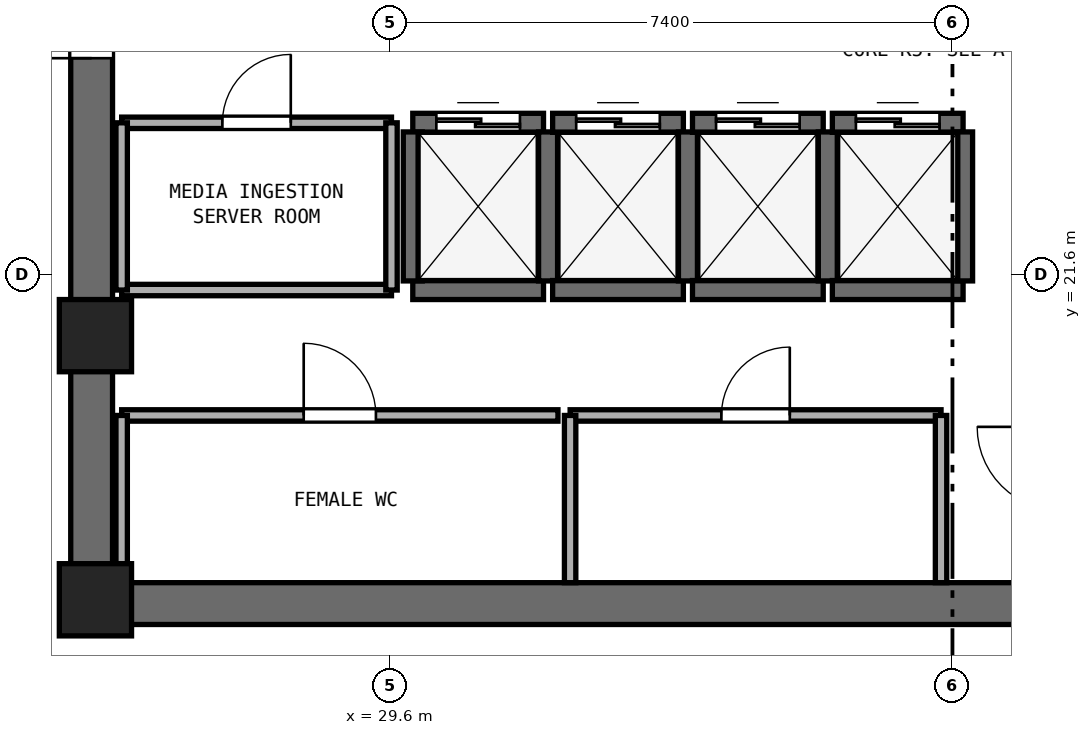
"""IFC4 building model, lengths in metres.
Left out: names, types, materials, properties, quantities, classifications, styles, units other than length and angle.
Written with IfcOpenShell. Run it as: python <this file> out.ifc"""

import sys

from ifc_helpers import new_model, si_unit, direction, frame, frame_2d, origin, origin_2d, place, context, subcontext, project, spatial, rectangle, extrude, element, fill, save


model = new_model("IFC4")
c1 = context("Model", 3, precision=1e-05, world=origin(), true_north=direction((0.0, 1.0)))
c2 = subcontext(c1, "Body", "Model", "MODEL_VIEW")
j1 = project(units=[si_unit("LENGTHUNIT", "METRE"), si_unit("PLANEANGLEUNIT", "RADIAN")], contexts=[c1])
p1 = place(None, origin())
s1 = spatial("IfcSite", under=j1, at=p1, CompositionType="ELEMENT")
p2 = place(p1, origin())
s2 = spatial("IfcBuilding", under=s1, at=p2, CompositionType="ELEMENT")
p3 = place(p2, frame((0.0, 0.0, 212.4)))
s3 = spatial("IfcBuildingStorey", under=s2, at=p3, CompositionType="ELEMENT", Elevation=212.4)
p4 = place(p3, frame((25.4, 17.275, 0.0), z_axis=(0.0, 0.0, 1.0), x_axis=(1.0, 0.0, 0.0)))
e1 = element("IfcWall", 1, at=p4, inside=s3, PredefinedType="SHEAR", context=c2, shape_type="SweptSolid", body=[
    extrude(rectangle(XDim=23.2, YDim=0.55, at=frame_2d((11.6, 0.0))), origin(), (0.0, 0.0, 1.0), 3.54),
])
p5 = place(p3, frame((25.675, 17.55, 0.0), z_axis=(0.0, 0.0, 1.0), x_axis=(0.0, 1.0, 0.0)))
e2 = element("IfcWall", 2, at=p5, inside=s3, PredefinedType="SHEAR", context=c2, shape_type="SweptSolid", body=[
    extrude(rectangle(XDim=15.3, YDim=0.55, at=frame_2d((7.65, 0.0))), origin(), (0.0, 0.0, 1.0), 3.54),
])
p6 = place(p5, frame((6.9, 0.0, 0.0)))
e3 = element("IfcOpeningElement", 3, at=p6, cuts=e2, PredefinedType="OPENING", context=c2, shape_type="SweptSolid", body=[
    extrude(rectangle(XDim=1.5, YDim=2.15, at=frame_2d((0.75, 1.075))), frame((0.0, 0.285, 0.0), z_axis=(0.0, -1.0, 0.0), x_axis=(1.0, 0.0, 0.0)), (0.0, 0.0, 1.0), 0.57),
])
for number, where, z_axis, x_axis in (
    (4, (25.725, 17.325, 0.0), (0.0, 0.0, 1.0), (1.0, 0.0, 0.0)),
    (5, (25.725, 20.8, 0.0), (0.0, 0.0, 1.0), (1.0, 0.0, 0.0)),
):
    element("IfcColumn", number, at=place(p3, frame(where, z_axis=z_axis, x_axis=x_axis)), inside=s3, PredefinedType="PILASTER", context=c2, shape_type="SweptSolid", body=[
        extrude(rectangle(XDim=0.95, YDim=0.95, at=origin_2d()), origin(), (0.0, 0.0, 1.0), 3.8),
    ])
p7 = place(p3, frame((29.9, 21.4, 0.0), z_axis=(0.0, 0.0, 1.0), x_axis=(1.0, 0.0, 0.0)))
e6 = element("IfcWall", 6, at=p7, inside=s3, PredefinedType="SHEAR", context=c2, shape_type="SweptSolid", body=[
    extrude(rectangle(XDim=1.72, YDim=0.25, at=frame_2d((0.86, 0.0))), origin(), (0.0, 0.0, 1.0), 3.54),
])
p8 = place(p3, frame((29.9, 23.6, 0.0), z_axis=(0.0, 0.0, 1.0), x_axis=(1.0, 0.0, 0.0)))
e7 = element("IfcWall", 7, at=p8, inside=s3, PredefinedType="SHEAR", context=c2, shape_type="SweptSolid", body=[
    extrude(rectangle(XDim=1.72, YDim=0.25, at=frame_2d((0.86, 0.0))), origin(), (0.0, 0.0, 1.0), 3.54),
])
p9 = place(p8, frame((0.31, 0.0, 0.0)))
e8 = element("IfcOpeningElement", 8, at=p9, cuts=e7, PredefinedType="OPENING", context=c2, shape_type="SweptSolid", body=[
    extrude(rectangle(XDim=1.1, YDim=2.15, at=frame_2d((0.55, 1.075))), frame((0.0, 0.135, 0.0), z_axis=(0.0, -1.0, 0.0), x_axis=(1.0, 0.0, 0.0)), (0.0, 0.0, 1.0), 0.27),
])
for number, where, z_axis, x_axis in (
    (9, (29.9, 21.52, 0.0), (0.0, 0.0, 1.0), (0.0, 1.0, 0.0)),
    (10, (31.68, 21.52, 0.0), (0.0, 0.0, 1.0), (0.0, 1.0, 0.0)),
):
    element("IfcWall", number, at=place(p3, frame(where, z_axis=z_axis, x_axis=x_axis)), inside=s3, PredefinedType="SHEAR", context=c2, shape_type="SweptSolid", body=[
        extrude(rectangle(XDim=1.96, YDim=0.25, at=frame_2d((0.98, 0.0))), origin(), (0.0, 0.0, 1.0), 3.54),
    ])
p10 = place(p3, frame((31.74, 21.4, 0.0), z_axis=(0.0, 0.0, 1.0), x_axis=(1.0, 0.0, 0.0)))
e11 = element("IfcWall", 11, at=p10, inside=s3, PredefinedType="SHEAR", context=c2, shape_type="SweptSolid", body=[
    extrude(rectangle(XDim=1.72, YDim=0.25, at=frame_2d((0.86, 0.0))), origin(), (0.0, 0.0, 1.0), 3.54),
])
p11 = place(p3, frame((31.74, 23.6, 0.0), z_axis=(0.0, 0.0, 1.0), x_axis=(1.0, 0.0, 0.0)))
e12 = element("IfcWall", 12, at=p11, inside=s3, PredefinedType="SHEAR", context=c2, shape_type="SweptSolid", body=[
    extrude(rectangle(XDim=1.72, YDim=0.25, at=frame_2d((0.86, 0.0))), origin(), (0.0, 0.0, 1.0), 3.54),
])
p12 = place(p11, frame((0.31, 0.0, 0.0)))
e13 = element("IfcOpeningElement", 13, at=p12, cuts=e12, PredefinedType="OPENING", context=c2, shape_type="SweptSolid", body=[
    extrude(rectangle(XDim=1.1, YDim=2.15, at=frame_2d((0.55, 1.075))), frame((0.0, 0.135, 0.0), z_axis=(0.0, -1.0, 0.0), x_axis=(1.0, 0.0, 0.0)), (0.0, 0.0, 1.0), 0.27),
])
p13 = place(p3, frame((33.52, 21.52, 0.0), z_axis=(0.0, 0.0, 1.0), x_axis=(0.0, 1.0, 0.0)))
e14 = element("IfcWall", 14, at=p13, inside=s3, PredefinedType="SHEAR", context=c2, shape_type="SweptSolid", body=[
    extrude(rectangle(XDim=1.96, YDim=0.25, at=frame_2d((0.98, 0.0))), origin(), (0.0, 0.0, 1.0), 3.54),
])
p14 = place(p3, frame((33.58, 21.4, 0.0), z_axis=(0.0, 0.0, 1.0), x_axis=(1.0, 0.0, 0.0)))
e15 = element("IfcWall", 15, at=p14, inside=s3, PredefinedType="SHEAR", context=c2, shape_type="SweptSolid", body=[
    extrude(rectangle(XDim=1.72, YDim=0.25, at=frame_2d((0.86, 0.0))), origin(), (0.0, 0.0, 1.0), 3.54),
])
p15 = place(p3, frame((33.58, 23.6, 0.0), z_axis=(0.0, 0.0, 1.0), x_axis=(1.0, 0.0, 0.0)))
e16 = element("IfcWall", 16, at=p15, inside=s3, PredefinedType="SHEAR", context=c2, shape_type="SweptSolid", body=[
    extrude(rectangle(XDim=1.72, YDim=0.25, at=frame_2d((0.86, 0.0))), origin(), (0.0, 0.0, 1.0), 3.54),
])
p16 = place(p15, frame((0.31, 0.0, 0.0)))
e17 = element("IfcOpeningElement", 17, at=p16, cuts=e16, PredefinedType="OPENING", context=c2, shape_type="SweptSolid", body=[
    extrude(rectangle(XDim=1.1, YDim=2.15, at=frame_2d((0.55, 1.075))), frame((0.0, 0.135, 0.0), z_axis=(0.0, -1.0, 0.0), x_axis=(1.0, 0.0, 0.0)), (0.0, 0.0, 1.0), 0.27),
])
p17 = place(p3, frame((35.36, 21.52, 0.0), z_axis=(0.0, 0.0, 1.0), x_axis=(0.0, 1.0, 0.0)))
e18 = element("IfcWall", 18, at=p17, inside=s3, PredefinedType="SHEAR", context=c2, shape_type="SweptSolid", body=[
    extrude(rectangle(XDim=1.96, YDim=0.25, at=frame_2d((0.98, 0.0))), origin(), (0.0, 0.0, 1.0), 3.54),
])
p18 = place(p3, frame((35.42, 21.4, 0.0), z_axis=(0.0, 0.0, 1.0), x_axis=(1.0, 0.0, 0.0)))
e19 = element("IfcWall", 19, at=p18, inside=s3, PredefinedType="SHEAR", context=c2, shape_type="SweptSolid", body=[
    extrude(rectangle(XDim=1.72, YDim=0.25, at=frame_2d((0.86, 0.0))), origin(), (0.0, 0.0, 1.0), 3.54),
])
p19 = place(p3, frame((35.42, 23.6, 0.0), z_axis=(0.0, 0.0, 1.0), x_axis=(1.0, 0.0, 0.0)))
e20 = element("IfcWall", 20, at=p19, inside=s3, PredefinedType="SHEAR", context=c2, shape_type="SweptSolid", body=[
    extrude(rectangle(XDim=1.72, YDim=0.25, at=frame_2d((0.86, 0.0))), origin(), (0.0, 0.0, 1.0), 3.54),
])
p20 = place(p19, frame((0.31, 0.0, 0.0)))
e21 = element("IfcOpeningElement", 21, at=p20, cuts=e20, PredefinedType="OPENING", context=c2, shape_type="SweptSolid", body=[
    extrude(rectangle(XDim=1.1, YDim=2.15, at=frame_2d((0.55, 1.075))), frame((0.0, 0.135, 0.0), z_axis=(0.0, -1.0, 0.0), x_axis=(1.0, 0.0, 0.0)), (0.0, 0.0, 1.0), 0.27),
])
p21 = place(p3, frame((37.14, 21.52, 0.0), z_axis=(0.0, 0.0, 1.0), x_axis=(0.0, 1.0, 0.0)))
e22 = element("IfcWall", 22, at=p21, inside=s3, PredefinedType="SHEAR", context=c2, shape_type="SweptSolid", body=[
    extrude(rectangle(XDim=1.96, YDim=0.25, at=frame_2d((0.98, 0.0))), origin(), (0.0, 0.0, 1.0), 3.54),
])
p22 = place(p3, frame((26.07, 19.75, 0.0), z_axis=(0.0, 0.0, 1.0), x_axis=(1.0, 0.0, 0.0)))
e23 = element("IfcWall", 23, at=p22, inside=s3, PredefinedType="PARTITIONING", context=c2, shape_type="SweptSolid", body=[
    extrude(rectangle(XDim=5.74, YDim=0.15, at=frame_2d((2.87, 0.0))), origin(), (0.0, 0.0, 1.0), 3.54),
])
p23 = place(p22, frame((2.395, 0.0, 0.0)))
e24 = element("IfcOpeningElement", 24, at=p23, cuts=e23, PredefinedType="OPENING", context=c2, shape_type="SweptSolid", body=[
    extrude(rectangle(XDim=0.95, YDim=2.1, at=frame_2d((0.475, 1.05))), frame((0.0, 0.085, 0.0), z_axis=(0.0, -1.0, 0.0), x_axis=(1.0, 0.0, 0.0)), (0.0, 0.0, 1.0), 0.17),
])
p24 = place(p3, frame((26.07, 17.55, 0.0), z_axis=(0.0, 0.0, 1.0), x_axis=(0.0, 1.0, 0.0)))
e25 = element("IfcWall", 25, at=p24, inside=s3, PredefinedType="PARTITIONING", context=c2, shape_type="SweptSolid", body=[
    extrude(rectangle(XDim=2.2, YDim=0.15, at=frame_2d((1.1, 0.0))), origin(), (0.0, 0.0, 1.0), 2.64),
])
p25 = place(p3, frame((31.97, 19.75, 0.0), z_axis=(0.0, 0.0, 1.0), x_axis=(1.0, 0.0, 0.0)))
e26 = element("IfcWall", 26, at=p25, inside=s3, PredefinedType="PARTITIONING", context=c2, shape_type="SweptSolid", body=[
    extrude(rectangle(XDim=4.88, YDim=0.15, at=frame_2d((2.44, 0.0))), origin(), (0.0, 0.0, 1.0), 3.54),
])
p26 = place(p25, frame((1.99, 0.0, 0.0)))
e27 = element("IfcOpeningElement", 27, at=p26, cuts=e26, PredefinedType="OPENING", context=c2, shape_type="SweptSolid", body=[
    extrude(rectangle(XDim=0.9, YDim=2.1, at=frame_2d((0.45, 1.05))), frame((0.0, 0.085, 0.0), z_axis=(0.0, -1.0, 0.0), x_axis=(1.0, 0.0, 0.0)), (0.0, 0.0, 1.0), 0.17),
])
for number, where, z_axis, x_axis in (
    (28, (31.97, 17.55, 0.0), (0.0, 0.0, 1.0), (0.0, 1.0, 0.0)),
    (29, (36.85, 17.55, 0.0), (0.0, 0.0, 1.0), (0.0, 1.0, 0.0)),
):
    element("IfcWall", number, at=place(p3, frame(where, z_axis=z_axis, x_axis=x_axis)), inside=s3, PredefinedType="PARTITIONING", context=c2, shape_type="SweptSolid", body=[
        extrude(rectangle(XDim=2.2, YDim=0.15, at=frame_2d((1.1, 0.0))), origin(), (0.0, 0.0, 1.0), 3.54),
    ])
p27 = place(p3, frame((26.07, 21.4, 0.0), z_axis=(0.0, 0.0, 1.0), x_axis=(1.0, 0.0, 0.0)))
e30 = element("IfcWall", 30, at=p27, inside=s3, PredefinedType="PARTITIONING", context=c2, shape_type="SweptSolid", body=[
    extrude(rectangle(XDim=3.55, YDim=0.15, at=frame_2d((1.775, 0.0))), origin(), (0.0, 0.0, 1.0), 3.54),
])
p28 = place(p3, frame((26.07, 23.6, 0.0), z_axis=(0.0, 0.0, 1.0), x_axis=(1.0, 0.0, 0.0)))
e31 = element("IfcWall", 31, at=p28, inside=s3, PredefinedType="PARTITIONING", context=c2, shape_type="SweptSolid", body=[
    extrude(rectangle(XDim=3.55, YDim=0.15, at=frame_2d((1.775, 0.0))), origin(), (0.0, 0.0, 1.0), 3.54),
])
p29 = place(p28, frame((1.325, 0.0, 0.0)))
e32 = element("IfcOpeningElement", 32, at=p29, cuts=e31, PredefinedType="OPENING", context=c2, shape_type="SweptSolid", body=[
    extrude(rectangle(XDim=0.9, YDim=2.1, at=frame_2d((0.45, 1.05))), frame((0.0, 0.085, 0.0), z_axis=(0.0, -1.0, 0.0), x_axis=(1.0, 0.0, 0.0)), (0.0, 0.0, 1.0), 0.17),
])
p30 = place(p3, frame((26.07, 21.4, 0.0), z_axis=(0.0, 0.0, 1.0), x_axis=(0.0, 1.0, 0.0)))
e33 = element("IfcWall", 33, at=p30, inside=s3, PredefinedType="PARTITIONING", context=c2, shape_type="SweptSolid", body=[
    extrude(rectangle(XDim=2.2, YDim=0.15, at=frame_2d((1.1, 0.0))), origin(), (0.0, 0.0, 1.0), 2.64),
])
p31 = place(p3, frame((29.62, 21.4, 0.0), z_axis=(0.0, 0.0, 1.0), x_axis=(0.0, 1.0, 0.0)))
e34 = element("IfcWall", 34, at=p31, inside=s3, PredefinedType="PARTITIONING", context=c2, shape_type="SweptSolid", body=[
    extrude(rectangle(XDim=2.2, YDim=0.15, at=frame_2d((1.1, 0.0))), origin(), (0.0, 0.0, 1.0), 3.54),
])
p32 = place(p9, origin())
e35 = element("IfcDoor", 35, at=p32, inside=s3, OperationType="DOUBLE_DOOR_SLIDING", PredefinedType="DOOR", context=c2, shape_type="SweptSolid", body=[
    extrude(rectangle(XDim=1.1, YDim=2.15, at=frame_2d((0.55, 1.075))), frame((0.0, 0.025, 0.0), z_axis=(0.0, -1.0, 0.0), x_axis=(1.0, 0.0, 0.0)), (0.0, 0.0, 1.0), 0.05),
])
fill(e8, e35)
p33 = place(p12, origin())
e36 = element("IfcDoor", 36, at=p33, inside=s3, OperationType="DOUBLE_DOOR_SLIDING", PredefinedType="DOOR", context=c2, shape_type="SweptSolid", body=[
    extrude(rectangle(XDim=1.1, YDim=2.15, at=frame_2d((0.55, 1.075))), frame((0.0, 0.025, 0.0), z_axis=(0.0, -1.0, 0.0), x_axis=(1.0, 0.0, 0.0)), (0.0, 0.0, 1.0), 0.05),
])
fill(e13, e36)
p34 = place(p16, origin())
e37 = element("IfcDoor", 37, at=p34, inside=s3, OperationType="DOUBLE_DOOR_SLIDING", PredefinedType="DOOR", context=c2, shape_type="SweptSolid", body=[
    extrude(rectangle(XDim=1.1, YDim=2.15, at=frame_2d((0.55, 1.075))), frame((0.0, 0.025, 0.0), z_axis=(0.0, -1.0, 0.0), x_axis=(1.0, 0.0, 0.0)), (0.0, 0.0, 1.0), 0.05),
])
fill(e17, e37)
p35 = place(p20, origin())
e38 = element("IfcDoor", 38, at=p35, inside=s3, OperationType="DOUBLE_DOOR_SLIDING", PredefinedType="DOOR", context=c2, shape_type="SweptSolid", body=[
    extrude(rectangle(XDim=1.1, YDim=2.15, at=frame_2d((0.55, 1.075))), frame((0.0, 0.025, 0.0), z_axis=(0.0, -1.0, 0.0), x_axis=(1.0, 0.0, 0.0)), (0.0, 0.0, 1.0), 0.05),
])
fill(e21, e38)
p36 = place(p6, origin())
e39 = element("IfcDoor", 39, at=p36, inside=s3, OperationType="DOUBLE_DOOR_SINGLE_SWING", PredefinedType="DOOR", context=c2, shape_type="SweptSolid", body=[
    extrude(rectangle(XDim=1.5, YDim=2.15, at=frame_2d((0.75, 1.075))), frame((0.0, 0.025, 0.0), z_axis=(0.0, -1.0, 0.0), x_axis=(1.0, 0.0, 0.0)), (0.0, 0.0, 1.0), 0.05),
])
fill(e3, e39)
p37 = place(p23, origin())
e40 = element("IfcDoor", 40, at=p37, inside=s3, OperationType="SINGLE_SWING_LEFT", PredefinedType="DOOR", context=c2, shape_type="SweptSolid", body=[
    extrude(rectangle(XDim=0.95, YDim=2.1, at=frame_2d((0.475, 1.05))), frame((0.0, 0.025, 0.0), z_axis=(0.0, -1.0, 0.0), x_axis=(1.0, 0.0, 0.0)), (0.0, 0.0, 1.0), 0.05),
])
fill(e24, e40)
p38 = place(p26, origin())
e41 = element("IfcDoor", 41, at=p38, inside=s3, OperationType="SINGLE_SWING_RIGHT", PredefinedType="DOOR", context=c2, shape_type="SweptSolid", body=[
    extrude(rectangle(XDim=0.9, YDim=2.1, at=frame_2d((0.45, 1.05))), frame((0.0, 0.025, 0.0), z_axis=(0.0, -1.0, 0.0), x_axis=(1.0, 0.0, 0.0)), (0.0, 0.0, 1.0), 0.05),
])
fill(e27, e41)
p39 = place(p29, origin())
e42 = element("IfcDoor", 42, at=p39, inside=s3, OperationType="SINGLE_SWING_RIGHT", PredefinedType="DOOR", context=c2, shape_type="SweptSolid", body=[
    extrude(rectangle(XDim=0.9, YDim=2.1, at=frame_2d((0.45, 1.05))), frame((0.0, 0.025, 0.0), z_axis=(0.0, -1.0, 0.0), x_axis=(1.0, 0.0, 0.0)), (0.0, 0.0, 1.0), 0.05),
])
fill(e32, e42)
save(model, sys.argv[1])
